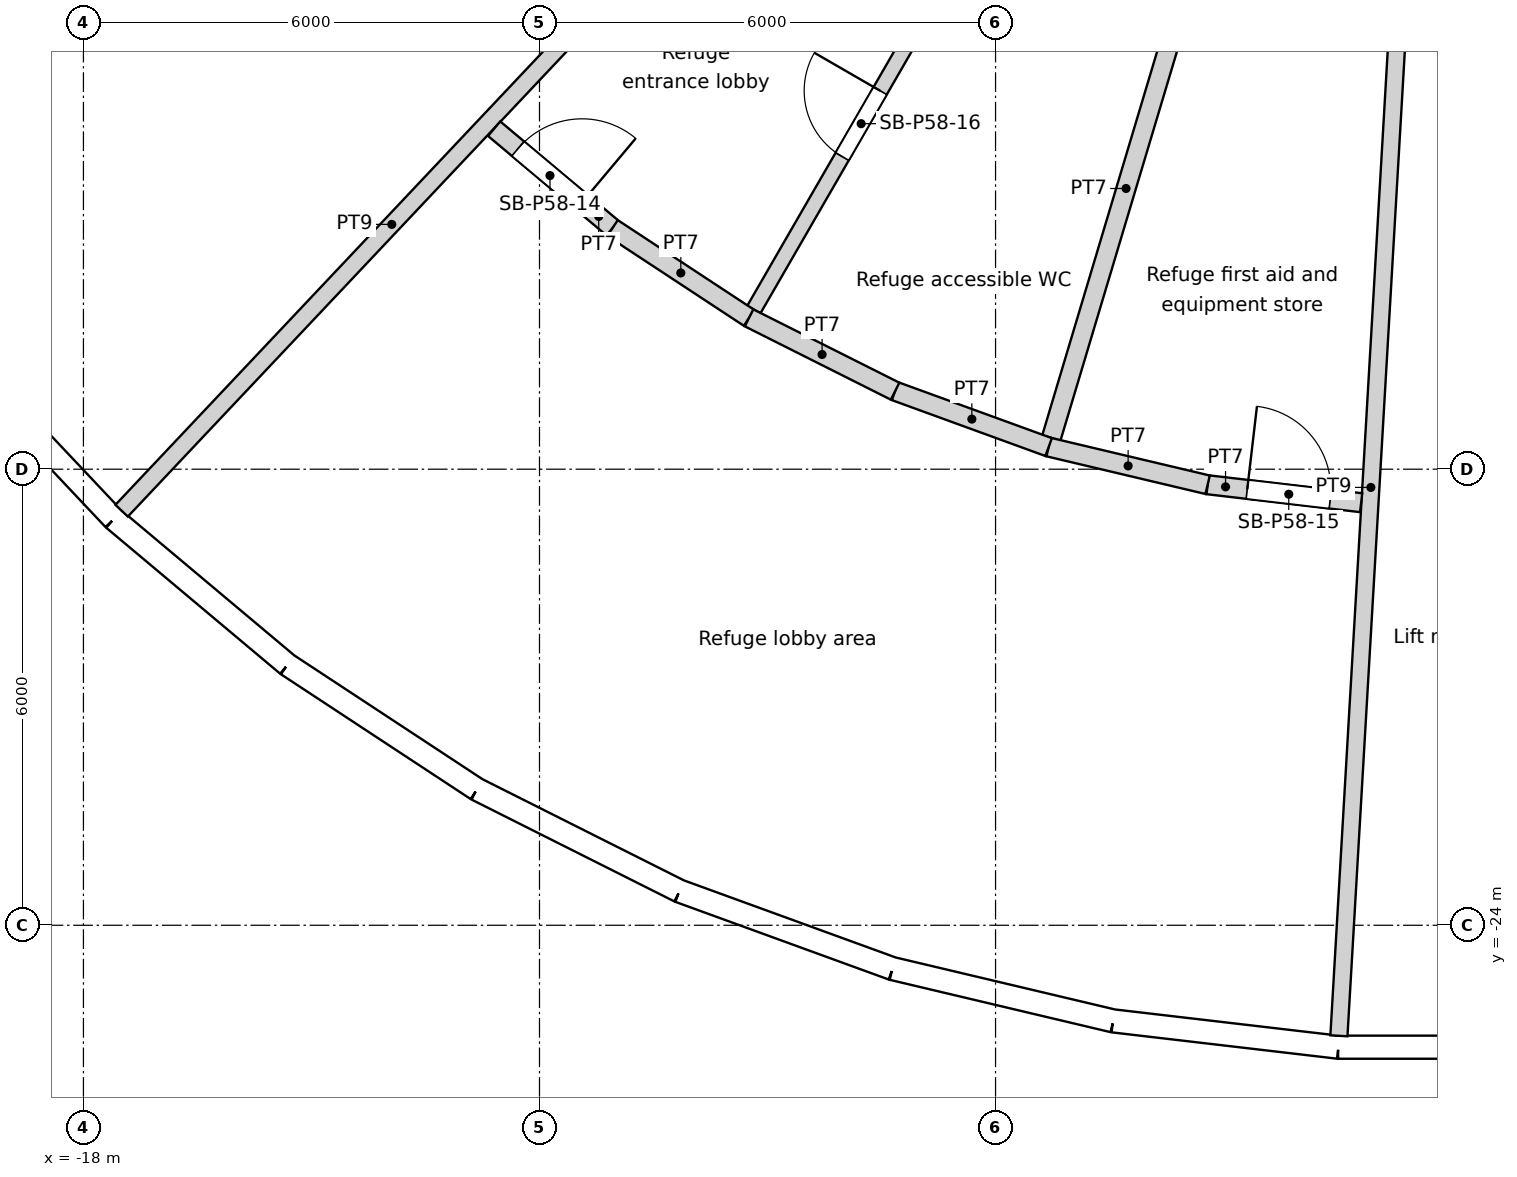
"""IFC4 building model, lengths in metres.
Left out: names, types, materials, properties, quantities, classifications, styles, units other than length and angle.
Written with IfcOpenShell. Run it as: python <this file> out.ifc"""

import sys

from ifc_helpers import new_model, si_unit, direction, frame, frame_2d, origin, origin_2d, place, context, subcontext, project, spatial, rectangle, circle, extrude, element, fill, save


model = new_model("IFC4")
c1 = context("Model", 3, precision=1e-05, world=origin(), true_north=direction((0.0, 1.0)))
c2 = subcontext(c1, "Body", "Model", "MODEL_VIEW")
j1 = project(units=[si_unit("LENGTHUNIT", "METRE"), si_unit("PLANEANGLEUNIT", "RADIAN")], contexts=[c1])
p1 = place(None, origin())
s1 = spatial("IfcSite", under=j1, at=p1, CompositionType="ELEMENT")
p2 = place(p1, origin())
s2 = spatial("IfcBuilding", under=s1, at=p2, CompositionType="ELEMENT")
p3 = place(p2, frame((0.0, 0.0, 225.0)))
s3 = spatial("IfcBuildingStorey", under=s2, at=p3, CompositionType="ELEMENT", Elevation=225.0)
for number, where, z_axis, x_axis in (
    (1, (-16.846, -17.855, 0.0), (0.0, 0.0, 1.0), (1.0, 0.0, 0.0)),
    (2, (-12.274, -21.259, 0.0), (0.0, 0.0, 1.0), (1.0, 0.0, 0.0)),
    (3, (-7.04, -23.516, 0.0), (0.0, 0.0, 1.0), (1.0, 0.0, 0.0)),
    (4, (-1.427, -24.506, 0.0), (0.0, 0.0, 1.0), (1.0, 0.0, 0.0)),
):
    element("IfcColumn", number, at=place(p3, frame(where, z_axis=z_axis, x_axis=x_axis)), inside=s3, PredefinedType="COLUMN", context=c2, shape_type="SweptSolid", body=[
        extrude(circle(Radius=0.6, at=origin_2d()), origin(), (0.0, 0.0, 1.0), 6.0),
    ])
for number, where, z_axis, x_axis in (
    (5, (-13.798, -12.802, 0.0), (0.0, 0.0, 1.0), (1.0, 0.0, 0.0)),
    (6, (-9.411, -16.301, 0.0), (0.0, 0.0, 1.0), (1.0, 0.0, 0.0)),
    (7, (-4.188, -18.35, 0.0), (0.0, 0.0, 1.0), (1.0, 0.0, 0.0)),
):
    element("IfcColumn", number, at=place(p3, frame(where, z_axis=z_axis, x_axis=x_axis)), inside=s3, PredefinedType="COLUMN", context=c2, shape_type="SweptSolid", body=[
        extrude(circle(Radius=0.65, at=origin_2d()), origin(), (0.0, 0.0, 1.0), 6.0),
    ])
p4 = place(p3, frame((-19.647, -16.486, 0.0), z_axis=(0.0, 0.0, 1.0), x_axis=(0.686219609698, -0.72739442345, 0.0)))
e8 = element("IfcWall", 8, at=p4, inside=s3, PredefinedType="SOLIDWALL", context=c2, shape_type="SweptSolid", body=[
    extrude(rectangle(XDim=2.982, YDim=0.3, at=frame_2d((1.491, 0.0))), origin(), (0.0, 0.0, 1.0), 5.65),
])
p5 = place(p4, frame((1.491, 0.0, 1.825)))
e9 = element("IfcOpeningElement", 9, at=p5, cuts=e8, PredefinedType="OPENING", context=c2, shape_type="SweptSolid", body=[
    extrude(circle(Radius=1.2, at=origin_2d()), frame((0.0, 0.16, 0.0), z_axis=(0.0, -1.0, 0.0), x_axis=(1.0, 0.0, 0.0)), (0.0, 0.0, 1.0), 0.32),
])
p6 = place(p3, frame((-17.6, -18.655, 0.0), z_axis=(0.0, 0.0, 1.0), x_axis=(0.766015999952, -0.64282150541, 0.0)))
e10 = element("IfcWall", 10, at=p6, inside=s3, PredefinedType="SOLIDWALL", context=c2, shape_type="SweptSolid", body=[
    extrude(rectangle(XDim=2.982, YDim=0.3, at=frame_2d((1.491, 0.0))), origin(), (0.0, 0.0, 1.0), 5.65),
])
p7 = place(p6, frame((1.491, 0.0, 1.825)))
e11 = element("IfcOpeningElement", 11, at=p7, cuts=e10, PredefinedType="OPENING", context=c2, shape_type="SweptSolid", body=[
    extrude(circle(Radius=1.2, at=origin_2d()), frame((0.0, 0.16, 0.0), z_axis=(0.0, -1.0, 0.0), x_axis=(1.0, 0.0, 0.0)), (0.0, 0.0, 1.0), 0.32),
])
p8 = place(p3, frame((-15.316, -20.573, 0.0), z_axis=(0.0, 0.0, 1.0), x_axis=(0.835497187922, -0.549494721517, 0.0)))
e12 = element("IfcWall", 12, at=p8, inside=s3, PredefinedType="SOLIDWALL", context=c2, shape_type="SweptSolid", body=[
    extrude(rectangle(XDim=2.983, YDim=0.3, at=frame_2d((1.491, 0.0))), origin(), (0.0, 0.0, 1.0), 5.65),
])
p9 = place(p8, frame((1.491, 0.0, 1.825)))
e13 = element("IfcOpeningElement", 13, at=p9, cuts=e12, PredefinedType="OPENING", context=c2, shape_type="SweptSolid", body=[
    extrude(circle(Radius=1.2, at=origin_2d()), frame((0.0, 0.16, 0.0), z_axis=(0.0, -1.0, 0.0), x_axis=(1.0, 0.0, 0.0)), (0.0, 0.0, 1.0), 0.32),
])
p10 = place(p3, frame((-12.824, -22.211, 0.0), z_axis=(0.0, 0.0, 1.0), x_axis=(0.893656390984, -0.448751885626, 0.0)))
e14 = element("IfcWall", 14, at=p10, inside=s3, PredefinedType="SOLIDWALL", context=c2, shape_type="SweptSolid", body=[
    extrude(rectangle(XDim=2.982, YDim=0.3, at=frame_2d((1.491, 0.0))), origin(), (0.0, 0.0, 1.0), 5.65),
])
p11 = place(p10, frame((1.491, 0.0, 1.825)))
e15 = element("IfcOpeningElement", 15, at=p11, cuts=e14, PredefinedType="OPENING", context=c2, shape_type="SweptSolid", body=[
    extrude(circle(Radius=1.2, at=origin_2d()), frame((0.0, 0.16, 0.0), z_axis=(0.0, -1.0, 0.0), x_axis=(1.0, 0.0, 0.0)), (0.0, 0.0, 1.0), 0.32),
])
p12 = place(p3, frame((-10.158, -23.55, 0.0), z_axis=(0.0, 0.0, 1.0), x_axis=(0.939676264274, -0.342065079129, 0.0)))
e16 = element("IfcWall", 16, at=p12, inside=s3, PredefinedType="SOLIDWALL", context=c2, shape_type="SweptSolid", body=[
    extrude(rectangle(XDim=2.983, YDim=0.3, at=frame_2d((1.491, 0.0))), origin(), (0.0, 0.0, 1.0), 5.65),
])
p13 = place(p12, frame((1.491, 0.0, 1.825)))
e17 = element("IfcOpeningElement", 17, at=p13, cuts=e16, PredefinedType="OPENING", context=c2, shape_type="SweptSolid", body=[
    extrude(circle(Radius=1.2, at=origin_2d()), frame((0.0, 0.16, 0.0), z_axis=(0.0, -1.0, 0.0), x_axis=(1.0, 0.0, 0.0)), (0.0, 0.0, 1.0), 0.32),
])
p14 = place(p3, frame((-7.356, -24.57, 0.0), z_axis=(0.0, 0.0, 1.0), x_axis=(0.973049843813, -0.230594886012, 0.0)))
e18 = element("IfcWall", 18, at=p14, inside=s3, PredefinedType="SOLIDWALL", context=c2, shape_type="SweptSolid", body=[
    extrude(rectangle(XDim=2.982, YDim=0.3, at=frame_2d((1.491, 0.0))), origin(), (0.0, 0.0, 1.0), 5.65),
])
p15 = place(p14, frame((1.491, 0.0, 1.825)))
e19 = element("IfcOpeningElement", 19, at=p15, cuts=e18, PredefinedType="OPENING", context=c2, shape_type="SweptSolid", body=[
    extrude(circle(Radius=1.2, at=origin_2d()), frame((0.0, 0.16, 0.0), z_axis=(0.0, -1.0, 0.0), x_axis=(1.0, 0.0, 0.0)), (0.0, 0.0, 1.0), 0.32),
])
p16 = place(p3, frame((-4.454, -25.258, 0.0), z_axis=(0.0, 0.0, 1.0), x_axis=(0.993240822844, -0.116071821888, 0.0)))
e20 = element("IfcWall", 20, at=p16, inside=s3, PredefinedType="SOLIDWALL", context=c2, shape_type="SweptSolid", body=[
    extrude(rectangle(XDim=2.983, YDim=0.3, at=frame_2d((1.491, 0.0))), origin(), (0.0, 0.0, 1.0), 5.65),
])
p17 = place(p16, frame((1.491, 0.0, 1.825)))
e21 = element("IfcOpeningElement", 21, at=p17, cuts=e20, PredefinedType="OPENING", context=c2, shape_type="SweptSolid", body=[
    extrude(circle(Radius=1.2, at=origin_2d()), frame((0.0, 0.16, 0.0), z_axis=(0.0, -1.0, 0.0), x_axis=(1.0, 0.0, 0.0)), (0.0, 0.0, 1.0), 0.32),
])
p18 = place(p3, frame((-1.491, -25.604, 0.0), z_axis=(0.0, 0.0, 1.0), x_axis=(1.0, 0.0, 0.0)))
e22 = element("IfcWall", 22, at=p18, inside=s3, PredefinedType="SOLIDWALL", context=c2, shape_type="SweptSolid", body=[
    extrude(rectangle(XDim=2.982, YDim=0.3, at=frame_2d((1.491, 0.0))), origin(), (0.0, 0.0, 1.0), 5.65),
])
p19 = place(p18, frame((1.491, 0.0, 1.825)))
e23 = element("IfcOpeningElement", 23, at=p19, cuts=e22, PredefinedType="OPENING", context=c2, shape_type="SweptSolid", body=[
    extrude(circle(Radius=1.2, at=origin_2d()), frame((0.0, 0.16, 0.0), z_axis=(0.0, -1.0, 0.0), x_axis=(1.0, 0.0, 0.0)), (0.0, 0.0, 1.0), 0.32),
])
p20 = place(p3, frame((-17.497, -18.546, 0.0), z_axis=(0.0, 0.0, 1.0), x_axis=(0.686253135809, 0.727362793654, 0.0)))
e24 = element("IfcWall", 24, at=p20, inside=s3, PredefinedType="PARTITIONING", context=c2, shape_type="SweptSolid", body=[
    extrude(rectangle(XDim=10.357, YDim=0.225, at=frame_2d((5.179, 0.0))), origin(), (0.0, 0.0, 1.0), 2.7),
])
p21 = place(p3, frame((-11.039, -14.827, 0.0), z_axis=(0.0, 0.0, 1.0), x_axis=(-0.766021768974, 0.642814630713, 0.0)))
e25 = element("IfcWall", 25, at=p21, inside=s3, PredefinedType="PARTITIONING", context=c2, shape_type="SweptSolid", body=[
    extrude(rectangle(XDim=2.033, YDim=0.25, at=frame_2d((1.017, 0.0))), origin(), (0.0, 0.0, 1.0), 5.2),
])
p22 = place(p21, frame((0.525, 0.0, 0.0)))
e26 = element("IfcOpeningElement", 26, at=p22, cuts=e25, PredefinedType="OPENING", context=c2, shape_type="SweptSolid", body=[
    extrude(rectangle(XDim=1.1, YDim=2.1, at=frame_2d((0.55, 1.05))), frame((0.0, 0.125, 0.0), z_axis=(0.0, -1.0, 0.0), x_axis=(1.0, 0.0, 0.0)), (0.0, 0.0, 1.0), 0.25),
])
p23 = place(p3, frame((-11.039, -14.827, 0.0), z_axis=(0.0, 0.0, 1.0), x_axis=(0.835476081401, -0.549526812274, 0.0)))
e27 = element("IfcWall", 27, at=p23, inside=s3, PredefinedType="PARTITIONING", context=c2, shape_type="SweptSolid", body=[
    extrude(rectangle(XDim=2.15, YDim=0.25, at=frame_2d((1.075, 0.0))), origin(), (0.0, 0.0, 1.0), 5.2),
])
p24 = place(p3, frame((-9.243, -16.009, 0.0), z_axis=(0.0, 0.0, 1.0), x_axis=(0.893653507888, -0.448757627055, 0.0)))
e28 = element("IfcWall", 28, at=p24, inside=s3, PredefinedType="PARTITIONING", context=c2, shape_type="SweptSolid", body=[
    extrude(rectangle(XDim=2.149, YDim=0.25, at=frame_2d((1.075, 0.0))), origin(), (0.0, 0.0, 1.0), 5.2),
])
p25 = place(p3, frame((-6.351, -11.0, 0.0), z_axis=(0.0, 0.0, 1.0), x_axis=(-0.500013765421, -0.866017456169, 0.0)))
e29 = element("IfcWall", 29, at=p25, inside=s3, PredefinedType="PARTITIONING", context=c2, shape_type="SweptSolid", body=[
    extrude(rectangle(XDim=5.658, YDim=0.2, at=frame_2d((2.829, 0.0))), origin(), (0.0, 0.0, 1.0), 5.2),
])
p26 = place(p25, frame((2.334, 0.0, 0.0)))
e30 = element("IfcOpeningElement", 30, at=p26, cuts=e29, PredefinedType="OPENING", context=c2, shape_type="SweptSolid", body=[
    extrude(rectangle(XDim=1.0, YDim=2.1, at=frame_2d((0.5, 1.05))), frame((0.0, 0.1, 0.0), z_axis=(0.0, -1.0, 0.0), x_axis=(1.0, 0.0, 0.0)), (0.0, 0.0, 1.0), 0.2),
])
p27 = place(p3, frame((-7.322, -16.973, 0.0), z_axis=(0.0, 0.0, 1.0), x_axis=(0.93967399384, -0.342071316104, 0.0)))
e31 = element("IfcWall", 31, at=p27, inside=s3, PredefinedType="PARTITIONING", context=c2, shape_type="SweptSolid", body=[
    extrude(rectangle(XDim=2.15, YDim=0.25, at=frame_2d((1.075, 0.0))), origin(), (0.0, 0.0, 1.0), 5.2),
])
p28 = place(p3, frame((-5.266, -17.589, 0.0), z_axis=(0.0, 0.0, 1.0), x_axis=(0.286831354486, 0.957981092759, 0.0)))
e32 = element("IfcWall", 32, at=p28, inside=s3, PredefinedType="PARTITIONING", context=c2, shape_type="SweptSolid", body=[
    extrude(rectangle(XDim=6.852, YDim=0.25, at=frame_2d((3.426, 0.0))), origin(), (0.0, 0.0, 1.0), 5.2),
])
p29 = place(p3, frame((-5.302, -17.709, 0.0), z_axis=(0.0, 0.0, 1.0), x_axis=(0.973036034562, -0.230653149649, 0.0)))
e33 = element("IfcWall", 33, at=p29, inside=s3, PredefinedType="PARTITIONING", context=c2, shape_type="SweptSolid", body=[
    extrude(rectangle(XDim=2.15, YDim=0.25, at=frame_2d((1.075, 0.0))), origin(), (0.0, 0.0, 1.0), 5.2),
])
p30 = place(p3, frame((-3.21, -18.205, 0.0), z_axis=(0.0, 0.0, 1.0), x_axis=(0.993238011892, -0.116095873021, 0.0)))
e34 = element("IfcWall", 34, at=p30, inside=s3, PredefinedType="PARTITIONING", context=c2, shape_type="SweptSolid", body=[
    extrude(rectangle(XDim=2.033, YDim=0.25, at=frame_2d((1.017, 0.0))), origin(), (0.0, 0.0, 1.0), 5.2),
])
p31 = place(p30, frame((0.525, 0.0, 0.0)))
e35 = element("IfcOpeningElement", 35, at=p31, cuts=e34, PredefinedType="OPENING", context=c2, shape_type="SweptSolid", body=[
    extrude(rectangle(XDim=1.1, YDim=2.1, at=frame_2d((0.55, 1.05))), frame((0.0, 0.125, 0.0), z_axis=(0.0, -1.0, 0.0), x_axis=(1.0, 0.0, 0.0)), (0.0, 0.0, 1.0), 0.25),
])
p32 = place(p3, frame((-1.482, -25.454, 0.0), z_axis=(0.0, 0.0, 1.0), x_axis=(0.058139787004, 0.998308451916, 0.0)))
e36 = element("IfcWall", 36, at=p32, inside=s3, PredefinedType="PARTITIONING", context=c2, shape_type="SweptSolid", body=[
    extrude(rectangle(XDim=14.454, YDim=0.225, at=frame_2d((7.227, 0.0))), origin(), (0.0, 0.0, 1.0), 2.7),
])
p33 = place(p5, origin())
e37 = element("IfcWindow", 37, at=p33, inside=s3, PartitioningType="SINGLE_PANEL", PredefinedType="WINDOW", context=c2, shape_type="SweptSolid", body=[
    extrude(circle(Radius=1.2, at=origin_2d()), frame((0.0, 0.12, 0.0), z_axis=(0.0, -1.0, 0.0), x_axis=(1.0, 0.0, 0.0)), (0.0, 0.0, 1.0), 0.1),
])
fill(e9, e37)
p34 = place(p7, origin())
e38 = element("IfcWindow", 38, at=p34, inside=s3, PartitioningType="SINGLE_PANEL", PredefinedType="WINDOW", context=c2, shape_type="SweptSolid", body=[
    extrude(circle(Radius=1.2, at=origin_2d()), frame((0.0, 0.12, 0.0), z_axis=(0.0, -1.0, 0.0), x_axis=(1.0, 0.0, 0.0)), (0.0, 0.0, 1.0), 0.1),
])
fill(e11, e38)
p35 = place(p9, origin())
e39 = element("IfcWindow", 39, at=p35, inside=s3, PartitioningType="SINGLE_PANEL", PredefinedType="WINDOW", context=c2, shape_type="SweptSolid", body=[
    extrude(circle(Radius=1.2, at=origin_2d()), frame((0.0, 0.12, 0.0), z_axis=(0.0, -1.0, 0.0), x_axis=(1.0, 0.0, 0.0)), (0.0, 0.0, 1.0), 0.1),
])
fill(e13, e39)
p36 = place(p11, origin())
e40 = element("IfcWindow", 40, at=p36, inside=s3, PartitioningType="SINGLE_PANEL", PredefinedType="WINDOW", context=c2, shape_type="SweptSolid", body=[
    extrude(circle(Radius=1.2, at=origin_2d()), frame((0.0, 0.12, 0.0), z_axis=(0.0, -1.0, 0.0), x_axis=(1.0, 0.0, 0.0)), (0.0, 0.0, 1.0), 0.1),
])
fill(e15, e40)
p37 = place(p13, origin())
e41 = element("IfcWindow", 41, at=p37, inside=s3, PartitioningType="SINGLE_PANEL", PredefinedType="WINDOW", context=c2, shape_type="SweptSolid", body=[
    extrude(circle(Radius=1.2, at=origin_2d()), frame((0.0, 0.12, 0.0), z_axis=(0.0, -1.0, 0.0), x_axis=(1.0, 0.0, 0.0)), (0.0, 0.0, 1.0), 0.1),
])
fill(e17, e41)
p38 = place(p15, origin())
e42 = element("IfcWindow", 42, at=p38, inside=s3, PartitioningType="SINGLE_PANEL", PredefinedType="WINDOW", context=c2, shape_type="SweptSolid", body=[
    extrude(circle(Radius=1.2, at=origin_2d()), frame((0.0, 0.12, 0.0), z_axis=(0.0, -1.0, 0.0), x_axis=(1.0, 0.0, 0.0)), (0.0, 0.0, 1.0), 0.1),
])
fill(e19, e42)
p39 = place(p17, origin())
e43 = element("IfcWindow", 43, at=p39, inside=s3, PartitioningType="SINGLE_PANEL", PredefinedType="WINDOW", context=c2, shape_type="SweptSolid", body=[
    extrude(circle(Radius=1.2, at=origin_2d()), frame((0.0, 0.12, 0.0), z_axis=(0.0, -1.0, 0.0), x_axis=(1.0, 0.0, 0.0)), (0.0, 0.0, 1.0), 0.1),
])
fill(e21, e43)
p40 = place(p19, origin())
e44 = element("IfcWindow", 44, at=p40, inside=s3, PartitioningType="SINGLE_PANEL", PredefinedType="WINDOW", context=c2, shape_type="SweptSolid", body=[
    extrude(circle(Radius=1.2, at=origin_2d()), frame((0.0, 0.12, 0.0), z_axis=(0.0, -1.0, 0.0), x_axis=(1.0, 0.0, 0.0)), (0.0, 0.0, 1.0), 0.1),
])
fill(e23, e44)
p41 = place(p22, origin())
e45 = element("IfcDoor", 45, at=p41, inside=s3, OperationType="SINGLE_SWING_RIGHT", PredefinedType="DOOR", context=c2, shape_type="SweptSolid", body=[
    extrude(rectangle(XDim=1.1, YDim=2.1, at=frame_2d((0.55, 1.05))), frame((0.0, 0.025, 0.0), z_axis=(0.0, -1.0, 0.0), x_axis=(1.0, 0.0, 0.0)), (0.0, 0.0, 1.0), 0.05),
])
fill(e26, e45)
p42 = place(p31, origin())
e46 = element("IfcDoor", 46, at=p42, inside=s3, OperationType="SINGLE_SWING_LEFT", PredefinedType="DOOR", context=c2, shape_type="SweptSolid", body=[
    extrude(rectangle(XDim=1.1, YDim=2.1, at=frame_2d((0.55, 1.05))), frame((0.0, 0.025, 0.0), z_axis=(0.0, -1.0, 0.0), x_axis=(1.0, 0.0, 0.0)), (0.0, 0.0, 1.0), 0.05),
])
fill(e35, e46)
p43 = place(p26, origin())
e47 = element("IfcDoor", 47, at=p43, inside=s3, OperationType="SINGLE_SWING_RIGHT", PredefinedType="DOOR", context=c2, shape_type="SweptSolid", body=[
    extrude(rectangle(XDim=1.0, YDim=2.1, at=frame_2d((0.5, 1.05))), frame((0.0, 0.025, 0.0), z_axis=(0.0, -1.0, 0.0), x_axis=(1.0, 0.0, 0.0)), (0.0, 0.0, 1.0), 0.05),
])
fill(e30, e47)
save(model, sys.argv[1])
